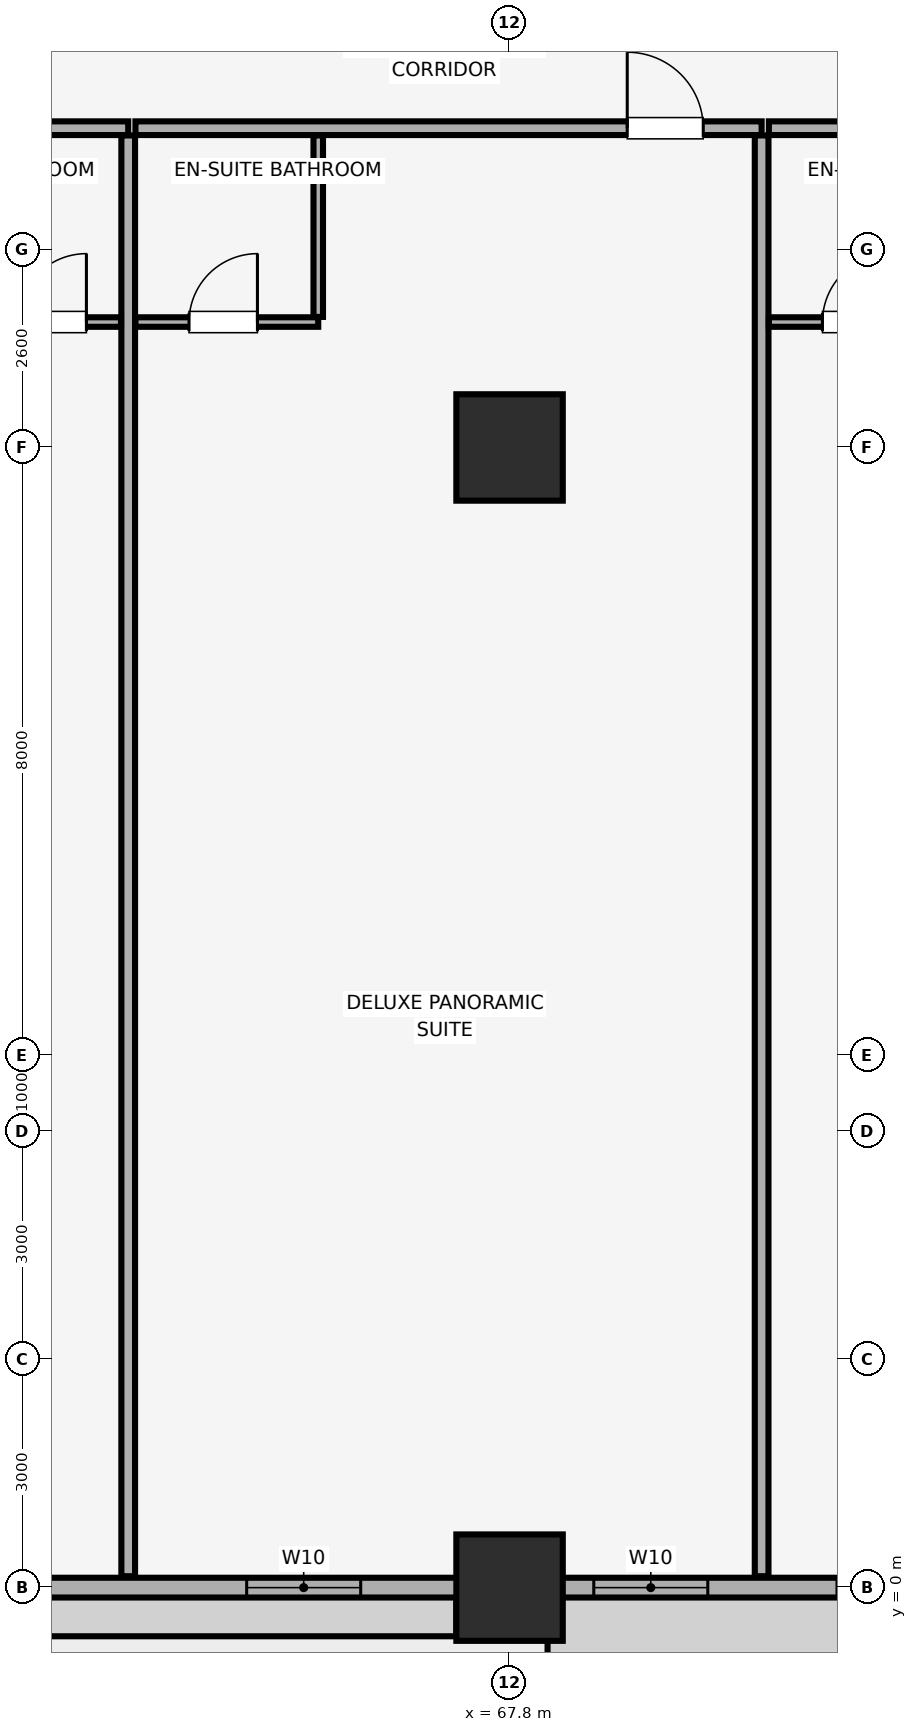
"""IFC4 building model, lengths in metres.
Left out: names, types, materials, properties, quantities, classifications, styles, units other than length and angle.
Written with IfcOpenShell. Run it as: python <this file> out.ifc"""

import sys

from ifc_helpers import new_model, si_unit, direction, frame, frame_2d, origin, origin_2d, place, context, subcontext, project, spatial, rectangle, extrude, element, fill, save


model = new_model("IFC4")
c1 = context("Model", 3, precision=1e-05, world=origin(), true_north=direction((0.0, 1.0)))
c2 = subcontext(c1, "Body", "Model", "MODEL_VIEW")
j1 = project(units=[si_unit("LENGTHUNIT", "METRE"), si_unit("PLANEANGLEUNIT", "RADIAN")], contexts=[c1])
p1 = place(None, origin())
s1 = spatial("IfcSite", under=j1, at=p1, CompositionType="ELEMENT")
p2 = place(p1, origin())
s2 = spatial("IfcBuilding", under=s1, at=p2, CompositionType="ELEMENT")
p3 = place(p2, frame((0.0, 0.0, 76.4)))
s3 = spatial("IfcBuildingStorey", under=s2, at=p3, CompositionType="ELEMENT", Elevation=76.4)
for number, where, z_axis, x_axis in (
    (1, (67.8, 0.0, 0.0), (0.0, 0.0, 1.0), (1.0, 0.0, 0.0)),
    (2, (67.8, 15.0, 0.0), (0.0, 0.0, 1.0), (1.0, 0.0, 0.0)),
):
    element("IfcColumn", number, at=place(p3, frame(where, z_axis=z_axis, x_axis=x_axis)), inside=s3, PredefinedType="COLUMN", context=c2, shape_type="SweptSolid", body=[
        extrude(rectangle(XDim=1.4, YDim=1.4, at=origin_2d()), origin(), (0.0, 0.0, 1.0), 3.4),
    ])
p4 = place(p3, frame((4.2, 0.0, 0.0), z_axis=(0.0, 0.0, 1.0), x_axis=(1.0, 0.0, 0.0)))
e3 = element("IfcWall", 3, at=p4, inside=s3, PredefinedType="SOLIDWALL", context=c2, shape_type="SweptSolid", body=[
    extrude(rectangle(XDim=75.6, YDim=0.26, at=frame_2d((37.8, 0.0))), origin(), (0.0, 0.0, 1.0), 2.45),
])
p5 = place(p4, frame((21.383, 0.0, 0.0)))
e4 = element("IfcOpeningElement", 4, at=p5, cuts=e3, PredefinedType="OPENING", context=c2, shape_type="SweptSolid", body=[
    extrude(rectangle(XDim=1.1, YDim=2.15, at=frame_2d((0.55, 1.075))), frame((0.0, 0.14, 0.0), z_axis=(0.0, -1.0, 0.0), x_axis=(1.0, 0.0, 0.0)), (0.0, 0.0, 1.0), 0.28),
])
p6 = place(p4, frame((37.25, 0.0, 0.0)))
e5 = element("IfcOpeningElement", 5, at=p6, cuts=e3, PredefinedType="OPENING", context=c2, shape_type="SweptSolid", body=[
    extrude(rectangle(XDim=1.1, YDim=2.15, at=frame_2d((0.55, 1.075))), frame((0.0, 0.14, 0.0), z_axis=(0.0, -1.0, 0.0), x_axis=(1.0, 0.0, 0.0)), (0.0, 0.0, 1.0), 0.28),
])
p7 = place(p4, frame((53.117, 0.0, 0.0)))
e6 = element("IfcOpeningElement", 6, at=p7, cuts=e3, PredefinedType="OPENING", context=c2, shape_type="SweptSolid", body=[
    extrude(rectangle(XDim=1.1, YDim=2.15, at=frame_2d((0.55, 1.075))), frame((0.0, 0.14, 0.0), z_axis=(0.0, -1.0, 0.0), x_axis=(1.0, 0.0, 0.0)), (0.0, 0.0, 1.0), 0.28),
])
p8 = place(p4, frame((1.485, 0.0, 0.85)))
e7 = element("IfcOpeningElement", 7, at=p8, cuts=e3, PredefinedType="OPENING", context=c2, shape_type="SweptSolid", body=[
    extrude(rectangle(XDim=1.5, YDim=1.4, at=frame_2d((0.75, 0.7))), frame((0.0, 0.14, 0.0), z_axis=(0.0, -1.0, 0.0), x_axis=(1.0, 0.0, 0.0)), (0.0, 0.0, 1.0), 0.28),
])
p9 = place(p4, frame((6.142, 0.0, 0.85)))
e8 = element("IfcOpeningElement", 8, at=p9, cuts=e3, PredefinedType="OPENING", context=c2, shape_type="SweptSolid", body=[
    extrude(rectangle(XDim=1.5, YDim=1.4, at=frame_2d((0.75, 0.7))), frame((0.0, 0.14, 0.0), z_axis=(0.0, -1.0, 0.0), x_axis=(1.0, 0.0, 0.0)), (0.0, 0.0, 1.0), 0.28),
])
p10 = place(p4, frame((9.342, 0.0, 0.85)))
e9 = element("IfcOpeningElement", 9, at=p10, cuts=e3, PredefinedType="OPENING", context=c2, shape_type="SweptSolid", body=[
    extrude(rectangle(XDim=1.5, YDim=1.4, at=frame_2d((0.75, 0.7))), frame((0.0, 0.14, 0.0), z_axis=(0.0, -1.0, 0.0), x_axis=(1.0, 0.0, 0.0)), (0.0, 0.0, 1.0), 0.28),
])
p11 = place(p4, frame((13.908, 0.0, 0.85)))
e10 = element("IfcOpeningElement", 10, at=p11, cuts=e3, PredefinedType="OPENING", context=c2, shape_type="SweptSolid", body=[
    extrude(rectangle(XDim=1.5, YDim=1.4, at=frame_2d((0.75, 0.7))), frame((0.0, 0.14, 0.0), z_axis=(0.0, -1.0, 0.0), x_axis=(1.0, 0.0, 0.0)), (0.0, 0.0, 1.0), 0.28),
])
p12 = place(p4, frame((23.202, 0.0, 0.85)))
e11 = element("IfcOpeningElement", 11, at=p12, cuts=e3, PredefinedType="OPENING", context=c2, shape_type="SweptSolid", body=[
    extrude(rectangle(XDim=1.5, YDim=1.4, at=frame_2d((0.75, 0.7))), frame((0.0, 0.14, 0.0), z_axis=(0.0, -1.0, 0.0), x_axis=(1.0, 0.0, 0.0)), (0.0, 0.0, 1.0), 0.28),
])
p13 = place(p4, frame((29.25, 0.0, 0.85)))
e12 = element("IfcOpeningElement", 12, at=p13, cuts=e3, PredefinedType="OPENING", context=c2, shape_type="SweptSolid", body=[
    extrude(rectangle(XDim=1.5, YDim=1.4, at=frame_2d((0.75, 0.7))), frame((0.0, 0.14, 0.0), z_axis=(0.0, -1.0, 0.0), x_axis=(1.0, 0.0, 0.0)), (0.0, 0.0, 1.0), 0.28),
])
p14 = place(p4, frame((34.79, 0.0, 0.85)))
e13 = element("IfcOpeningElement", 13, at=p14, cuts=e3, PredefinedType="OPENING", context=c2, shape_type="SweptSolid", body=[
    extrude(rectangle(XDim=1.5, YDim=1.4, at=frame_2d((0.75, 0.7))), frame((0.0, 0.14, 0.0), z_axis=(0.0, -1.0, 0.0), x_axis=(1.0, 0.0, 0.0)), (0.0, 0.0, 1.0), 0.28),
])
p15 = place(p4, frame((39.31, 0.0, 0.85)))
e14 = element("IfcOpeningElement", 14, at=p15, cuts=e3, PredefinedType="OPENING", context=c2, shape_type="SweptSolid", body=[
    extrude(rectangle(XDim=1.5, YDim=1.4, at=frame_2d((0.75, 0.7))), frame((0.0, 0.14, 0.0), z_axis=(0.0, -1.0, 0.0), x_axis=(1.0, 0.0, 0.0)), (0.0, 0.0, 1.0), 0.28),
])
p16 = place(p4, frame((44.85, 0.0, 0.85)))
e15 = element("IfcOpeningElement", 15, at=p16, cuts=e3, PredefinedType="OPENING", context=c2, shape_type="SweptSolid", body=[
    extrude(rectangle(XDim=1.5, YDim=1.4, at=frame_2d((0.75, 0.7))), frame((0.0, 0.14, 0.0), z_axis=(0.0, -1.0, 0.0), x_axis=(1.0, 0.0, 0.0)), (0.0, 0.0, 1.0), 0.28),
])
p17 = place(p4, frame((50.848, 0.0, 0.85)))
e16 = element("IfcOpeningElement", 16, at=p17, cuts=e3, PredefinedType="OPENING", context=c2, shape_type="SweptSolid", body=[
    extrude(rectangle(XDim=1.5, YDim=1.4, at=frame_2d((0.75, 0.7))), frame((0.0, 0.14, 0.0), z_axis=(0.0, -1.0, 0.0), x_axis=(1.0, 0.0, 0.0)), (0.0, 0.0, 1.0), 0.28),
])
p18 = place(p4, frame((60.142, 0.0, 0.85)))
e17 = element("IfcOpeningElement", 17, at=p18, cuts=e3, PredefinedType="OPENING", context=c2, shape_type="SweptSolid", body=[
    extrude(rectangle(XDim=1.5, YDim=1.4, at=frame_2d((0.75, 0.7))), frame((0.0, 0.14, 0.0), z_axis=(0.0, -1.0, 0.0), x_axis=(1.0, 0.0, 0.0)), (0.0, 0.0, 1.0), 0.28),
])
p19 = place(p4, frame((64.708, 0.0, 0.85)))
e18 = element("IfcOpeningElement", 18, at=p19, cuts=e3, PredefinedType="OPENING", context=c2, shape_type="SweptSolid", body=[
    extrude(rectangle(XDim=1.5, YDim=1.4, at=frame_2d((0.75, 0.7))), frame((0.0, 0.14, 0.0), z_axis=(0.0, -1.0, 0.0), x_axis=(1.0, 0.0, 0.0)), (0.0, 0.0, 1.0), 0.28),
])
p20 = place(p4, frame((67.908, 0.0, 0.85)))
e19 = element("IfcOpeningElement", 19, at=p20, cuts=e3, PredefinedType="OPENING", context=c2, shape_type="SweptSolid", body=[
    extrude(rectangle(XDim=1.5, YDim=1.4, at=frame_2d((0.75, 0.7))), frame((0.0, 0.14, 0.0), z_axis=(0.0, -1.0, 0.0), x_axis=(1.0, 0.0, 0.0)), (0.0, 0.0, 1.0), 0.28),
])
p21 = place(p4, frame((72.615, 0.0, 0.85)))
e20 = element("IfcOpeningElement", 20, at=p21, cuts=e3, PredefinedType="OPENING", context=c2, shape_type="SweptSolid", body=[
    extrude(rectangle(XDim=1.5, YDim=1.4, at=frame_2d((0.75, 0.7))), frame((0.0, 0.14, 0.0), z_axis=(0.0, -1.0, 0.0), x_axis=(1.0, 0.0, 0.0)), (0.0, 0.0, 1.0), 0.28),
])
p22 = place(p3, frame((54.545, 19.2, 0.0), z_axis=(0.0, 0.0, 1.0), x_axis=(1.0, 0.0, 0.0)))
e21 = element("IfcWall", 21, at=p22, inside=s3, PredefinedType="PARTITIONING", context=c2, shape_type="SweptSolid", body=[
    extrude(rectangle(XDim=8.238, YDim=0.18, at=frame_2d((4.119, 0.0))), origin(), (0.0, 0.0, 1.0), 3.4),
])
p23 = place(p22, frame((1.872, 0.0, 0.0)))
e22 = element("IfcOpeningElement", 22, at=p23, cuts=e21, PredefinedType="OPENING", context=c2, shape_type="SweptSolid", body=[
    extrude(rectangle(XDim=1.0, YDim=2.15, at=frame_2d((0.5, 1.075))), frame((0.0, 0.1, 0.0), z_axis=(0.0, -1.0, 0.0), x_axis=(1.0, 0.0, 0.0)), (0.0, 0.0, 1.0), 0.2),
])
p24 = place(p3, frame((62.783, 0.15, 0.0), z_axis=(0.0, 0.0, 1.0), x_axis=(0.0, 1.0, 0.0)))
e23 = element("IfcWall", 23, at=p24, inside=s3, PredefinedType="PARTITIONING", context=c2, shape_type="SweptSolid", body=[
    extrude(rectangle(XDim=18.955, YDim=0.18, at=frame_2d((9.478, 0.0))), origin(), (0.0, 0.0, 1.0), 3.4),
])
p25 = place(p3, frame((60.283, 16.65, 0.0), z_axis=(0.0, 0.0, 1.0), x_axis=(1.0, 0.0, 0.0)))
e24 = element("IfcWall", 24, at=p25, inside=s3, PredefinedType="PARTITIONING", context=c2, shape_type="SweptSolid", body=[
    extrude(rectangle(XDim=2.405, YDim=0.125, at=frame_2d((1.203, 0.0))), origin(), (0.0, 0.0, 1.0), 3.4),
])
p26 = place(p25, frame((1.05, 0.0, 0.0)))
e25 = element("IfcOpeningElement", 25, at=p26, cuts=e24, PredefinedType="OPENING", context=c2, shape_type="SweptSolid", body=[
    extrude(rectangle(XDim=0.9, YDim=2.1, at=frame_2d((0.45, 1.05))), frame((0.0, 0.073, 0.0), z_axis=(0.0, -1.0, 0.0), x_axis=(1.0, 0.0, 0.0)), (0.0, 0.0, 1.0), 0.145),
])
p27 = place(p3, frame((62.878, 19.2, 0.0), z_axis=(0.0, 0.0, 1.0), x_axis=(1.0, 0.0, 0.0)))
e26 = element("IfcWall", 26, at=p27, inside=s3, PredefinedType="PARTITIONING", context=c2, shape_type="SweptSolid", body=[
    extrude(rectangle(XDim=8.238, YDim=0.18, at=frame_2d((4.119, 0.0))), origin(), (0.0, 0.0, 1.0), 3.4),
])
p28 = place(p27, frame((6.47, 0.0, 0.0)))
e27 = element("IfcOpeningElement", 27, at=p28, cuts=e26, PredefinedType="OPENING", context=c2, shape_type="SweptSolid", body=[
    extrude(rectangle(XDim=1.0, YDim=2.15, at=frame_2d((0.5, 1.075))), frame((0.0, 0.1, 0.0), z_axis=(0.0, -1.0, 0.0), x_axis=(1.0, 0.0, 0.0)), (0.0, 0.0, 1.0), 0.2),
])
p29 = place(p3, frame((71.116, 0.15, 0.0), z_axis=(0.0, 0.0, 1.0), x_axis=(0.0, 1.0, 0.0)))
e28 = element("IfcWall", 28, at=p29, inside=s3, PredefinedType="PARTITIONING", context=c2, shape_type="SweptSolid", body=[
    extrude(rectangle(XDim=18.955, YDim=0.18, at=frame_2d((9.478, 0.0))), origin(), (0.0, 0.0, 1.0), 3.4),
])
p30 = place(p3, frame((62.878, 16.65, 0.0), z_axis=(0.0, 0.0, 1.0), x_axis=(1.0, 0.0, 0.0)))
e29 = element("IfcWall", 29, at=p30, inside=s3, PredefinedType="PARTITIONING", context=c2, shape_type="SweptSolid", body=[
    extrude(rectangle(XDim=2.405, YDim=0.125, at=frame_2d((1.203, 0.0))), origin(), (0.0, 0.0, 1.0), 3.4),
])
p31 = place(p30, frame((0.705, 0.0, 0.0)))
e30 = element("IfcOpeningElement", 30, at=p31, cuts=e29, PredefinedType="OPENING", context=c2, shape_type="SweptSolid", body=[
    extrude(rectangle(XDim=0.9, YDim=2.1, at=frame_2d((0.45, 1.05))), frame((0.0, 0.073, 0.0), z_axis=(0.0, -1.0, 0.0), x_axis=(1.0, 0.0, 0.0)), (0.0, 0.0, 1.0), 0.145),
])
p32 = place(p3, frame((65.283, 16.718, 0.0), z_axis=(0.0, 0.0, 1.0), x_axis=(0.0, 1.0, 0.0)))
e31 = element("IfcWall", 31, at=p32, inside=s3, PredefinedType="PARTITIONING", context=c2, shape_type="SweptSolid", body=[
    extrude(rectangle(XDim=2.387, YDim=0.125, at=frame_2d((1.194, 0.0))), origin(), (0.0, 0.0, 1.0), 3.4),
])
p33 = place(p3, frame((71.211, 19.2, 0.0), z_axis=(0.0, 0.0, 1.0), x_axis=(1.0, 0.0, 0.0)))
e32 = element("IfcWall", 32, at=p33, inside=s3, PredefinedType="PARTITIONING", context=c2, shape_type="SweptSolid", body=[
    extrude(rectangle(XDim=12.639, YDim=0.18, at=frame_2d((6.319, 0.0))), origin(), (0.0, 0.0, 1.0), 3.4),
])
p34 = place(p33, frame((5.954, 0.0, 0.0)))
e33 = element("IfcOpeningElement", 33, at=p34, cuts=e32, PredefinedType="OPENING", context=c2, shape_type="SweptSolid", body=[
    extrude(rectangle(XDim=1.0, YDim=2.15, at=frame_2d((0.5, 1.075))), frame((0.0, 0.1, 0.0), z_axis=(0.0, -1.0, 0.0), x_axis=(1.0, 0.0, 0.0)), (0.0, 0.0, 1.0), 0.2),
])
p35 = place(p3, frame((71.211, 16.65, 0.0), z_axis=(0.0, 0.0, 1.0), x_axis=(1.0, 0.0, 0.0)))
e34 = element("IfcWall", 34, at=p35, inside=s3, PredefinedType="PARTITIONING", context=c2, shape_type="SweptSolid", body=[
    extrude(rectangle(XDim=2.405, YDim=0.125, at=frame_2d((1.203, 0.0))), origin(), (0.0, 0.0, 1.0), 3.4),
])
p36 = place(p35, frame((0.705, 0.0, 0.0)))
e35 = element("IfcOpeningElement", 35, at=p36, cuts=e34, PredefinedType="OPENING", context=c2, shape_type="SweptSolid", body=[
    extrude(rectangle(XDim=0.9, YDim=2.1, at=frame_2d((0.45, 1.05))), frame((0.0, 0.073, 0.0), z_axis=(0.0, -1.0, 0.0), x_axis=(1.0, 0.0, 0.0)), (0.0, 0.0, 1.0), 0.145),
])
p37 = place(p18, origin())
e36 = element("IfcWindow", 36, at=p37, inside=s3, PartitioningType="SINGLE_PANEL", PredefinedType="WINDOW", context=c2, shape_type="SweptSolid", body=[
    extrude(rectangle(XDim=1.5, YDim=1.4, at=frame_2d((0.75, 0.7))), frame((0.0, 0.03, 0.0), z_axis=(0.0, -1.0, 0.0), x_axis=(1.0, 0.0, 0.0)), (0.0, 0.0, 1.0), 0.06),
])
fill(e17, e36)
p38 = place(p19, origin())
e37 = element("IfcWindow", 37, at=p38, inside=s3, PartitioningType="SINGLE_PANEL", PredefinedType="WINDOW", context=c2, shape_type="SweptSolid", body=[
    extrude(rectangle(XDim=1.5, YDim=1.4, at=frame_2d((0.75, 0.7))), frame((0.0, 0.03, 0.0), z_axis=(0.0, -1.0, 0.0), x_axis=(1.0, 0.0, 0.0)), (0.0, 0.0, 1.0), 0.06),
])
fill(e18, e37)
p39 = place(p20, origin())
e38 = element("IfcWindow", 38, at=p39, inside=s3, PartitioningType="SINGLE_PANEL", PredefinedType="WINDOW", context=c2, shape_type="SweptSolid", body=[
    extrude(rectangle(XDim=1.5, YDim=1.4, at=frame_2d((0.75, 0.7))), frame((0.0, 0.03, 0.0), z_axis=(0.0, -1.0, 0.0), x_axis=(1.0, 0.0, 0.0)), (0.0, 0.0, 1.0), 0.06),
])
fill(e19, e38)
p40 = place(p26, origin())
e39 = element("IfcDoor", 39, at=p40, inside=s3, OperationType="SINGLE_SWING_RIGHT", PredefinedType="DOOR", context=c2, shape_type="SweptSolid", body=[
    extrude(rectangle(XDim=0.9, YDim=2.1, at=frame_2d((0.45, 1.05))), frame((0.0, 0.025, 0.0), z_axis=(0.0, -1.0, 0.0), x_axis=(1.0, 0.0, 0.0)), (0.0, 0.0, 1.0), 0.05),
])
fill(e25, e39)
p41 = place(p28, origin())
e40 = element("IfcDoor", 40, at=p41, inside=s3, OperationType="SINGLE_SWING_LEFT", PredefinedType="DOOR", context=c2, shape_type="SweptSolid", body=[
    extrude(rectangle(XDim=1.0, YDim=2.15, at=frame_2d((0.5, 1.075))), frame((0.0, 0.025, 0.0), z_axis=(0.0, -1.0, 0.0), x_axis=(1.0, 0.0, 0.0)), (0.0, 0.0, 1.0), 0.05),
])
fill(e27, e40)
p42 = place(p31, origin())
e41 = element("IfcDoor", 41, at=p42, inside=s3, OperationType="SINGLE_SWING_RIGHT", PredefinedType="DOOR", context=c2, shape_type="SweptSolid", body=[
    extrude(rectangle(XDim=0.9, YDim=2.1, at=frame_2d((0.45, 1.05))), frame((0.0, 0.025, 0.0), z_axis=(0.0, -1.0, 0.0), x_axis=(1.0, 0.0, 0.0)), (0.0, 0.0, 1.0), 0.05),
])
fill(e30, e41)
p43 = place(p36, origin())
e42 = element("IfcDoor", 42, at=p43, inside=s3, OperationType="SINGLE_SWING_RIGHT", PredefinedType="DOOR", context=c2, shape_type="SweptSolid", body=[
    extrude(rectangle(XDim=0.9, YDim=2.1, at=frame_2d((0.45, 1.05))), frame((0.0, 0.025, 0.0), z_axis=(0.0, -1.0, 0.0), x_axis=(1.0, 0.0, 0.0)), (0.0, 0.0, 1.0), 0.05),
])
fill(e35, e42)
save(model, sys.argv[1])
